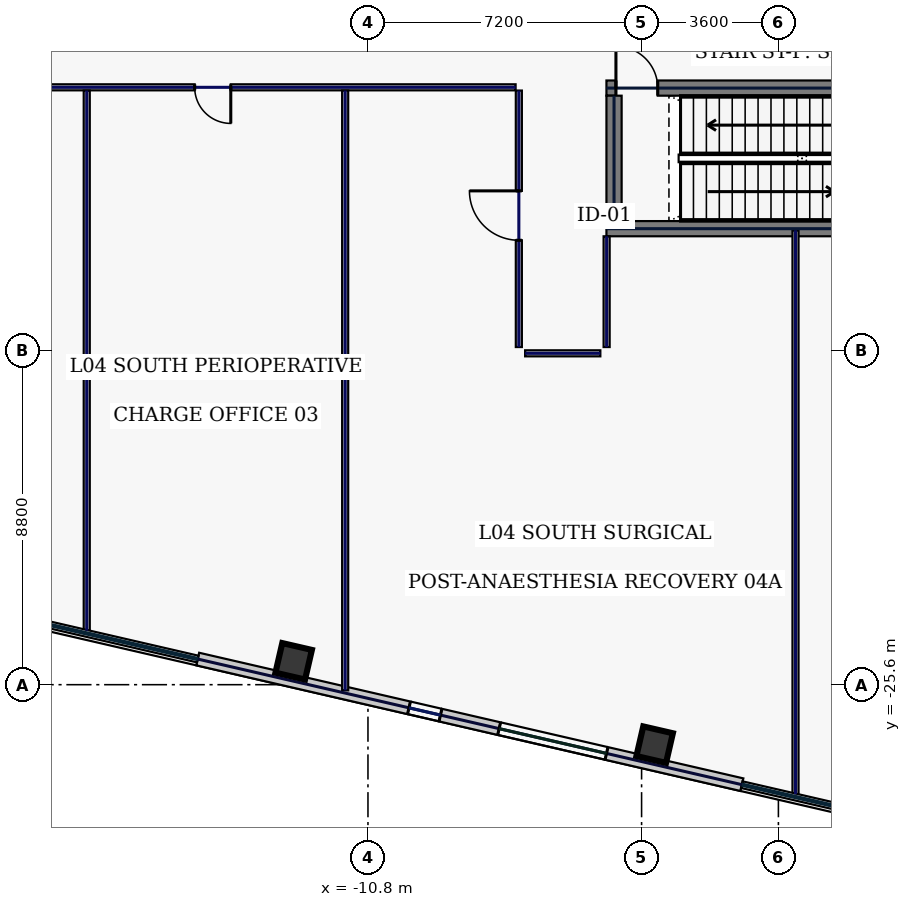
"""IFC4 building model, lengths in metres.
Left out: names, types, materials, properties, quantities, classifications, styles, units other than length and angle.
Written with IfcOpenShell. Run it as: python <this file> out.ifc"""

import sys

from ifc_helpers import new_model, si_unit, direction, frame, frame_2d, origin, origin_2d, place, context, subcontext, project, spatial, rectangle, hollow_rectangle, extrude, element, fill, save


model = new_model("IFC4")
c1 = context("Model", 3, precision=1e-05, world=origin(), true_north=direction((0.0, 1.0)))
c2 = subcontext(c1, "Body", "Model", "MODEL_VIEW")
j1 = project(units=[si_unit("LENGTHUNIT", "METRE"), si_unit("PLANEANGLEUNIT", "RADIAN")], contexts=[c1])
p1 = place(None, origin())
s1 = spatial("IfcSite", under=j1, at=p1, CompositionType="ELEMENT")
p2 = place(p1, origin())
s2 = spatial("IfcBuilding", under=s1, at=p2, CompositionType="ELEMENT")
p3 = place(p2, frame((0.0, 0.0, 23.4)))
s3 = spatial("IfcBuildingStorey", under=s2, at=p3, CompositionType="ELEMENT", Elevation=23.4)
p4 = place(p3, frame((-4.525, -13.6, 0.0), z_axis=(0.0, 0.0, 1.0), x_axis=(1.0, 0.0, 0.0)))
e1 = element("IfcWall", 1, at=p4, inside=s3, PredefinedType="SHEAR", context=c2, shape_type="SweptSolid", body=[
    extrude(rectangle(XDim=9.05, YDim=0.4, at=frame_2d((4.525, 0.0))), origin(), (0.0, 0.0, 1.0), 4.7),
])
p5 = place(p3, frame((-4.525, -9.9, 0.0), z_axis=(0.0, 0.0, 1.0), x_axis=(1.0, 0.0, 0.0)))
e2 = element("IfcWall", 2, at=p5, inside=s3, PredefinedType="SHEAR", context=c2, shape_type="SweptSolid", body=[
    extrude(rectangle(XDim=9.05, YDim=0.4, at=frame_2d((4.525, 0.0))), origin(), (0.0, 0.0, 1.0), 4.7),
])
p6 = place(p5, frame((0.25, 0.0, 0.0)))
e3 = element("IfcOpeningElement", 3, at=p6, cuts=e2, PredefinedType="OPENING", context=c2, shape_type="SweptSolid", body=[
    extrude(rectangle(XDim=1.1, YDim=2.2, at=frame_2d((0.55, 1.1))), frame((0.0, 0.21, 0.0), z_axis=(0.0, -1.0, 0.0), x_axis=(1.0, 0.0, 0.0)), (0.0, 0.0, 1.0), 0.42),
])
p7 = place(p3, frame((-4.325, -13.4, 0.0), z_axis=(0.0, 0.0, 1.0), x_axis=(0.0, 1.0, 0.0)))
e4 = element("IfcWall", 4, at=p7, inside=s3, PredefinedType="SHEAR", context=c2, shape_type="SweptSolid", body=[
    extrude(rectangle(XDim=3.3, YDim=0.4, at=frame_2d((1.65, 0.0))), origin(), (0.0, 0.0, 1.0), 4.7),
])
for number, where, z_axis, x_axis in (
    (5, (-12.755, -24.985, 0.0), (0.0, 0.0, 1.0), (0.974, -0.225, 0.0)),
    (6, (-3.256, -27.178, 0.0), (0.0, 0.0, 1.0), (0.974, -0.225, 0.0)),
):
    element("IfcColumn", number, at=place(p3, frame(where, z_axis=z_axis, x_axis=x_axis)), inside=s3, PredefinedType="COLUMN", context=c2, shape_type="SweptSolid", body=[
        extrude(hollow_rectangle(XDim=0.8, YDim=0.8, WallThickness=0.036, at=origin_2d()), origin(), (0.0, 0.0, 1.0), 4.7),
    ])
p8 = place(p3, frame((-15.281, -24.925, 0.0), z_axis=(0.0, 0.0, 1.0), x_axis=(0.974370193991, -0.22495049469, 0.0)))
e7 = element("IfcWall", 7, at=p8, inside=s3, PredefinedType="STANDARD", context=c2, shape_type="SweptSolid", body=[
    extrude(rectangle(XDim=14.697, YDim=0.34, at=frame_2d((7.349, 0.0))), origin(), (0.0, 0.0, 1.0), 4.7),
])
p9 = place(p8, frame((5.706, 0.0, 0.85)))
e8 = element("IfcOpeningElement", 8, at=p9, cuts=e7, PredefinedType="OPENING", context=c2, shape_type="SweptSolid", body=[
    extrude(rectangle(XDim=0.85, YDim=1.85, at=frame_2d((0.425, 0.925))), frame((0.0, 0.18, 0.0), z_axis=(0.0, -1.0, 0.0), x_axis=(1.0, 0.0, 0.0)), (0.0, 0.0, 1.0), 0.36),
])
p10 = place(p8, frame((8.141, 0.0, 0.85)))
e9 = element("IfcOpeningElement", 9, at=p10, cuts=e7, PredefinedType="OPENING", context=c2, shape_type="SweptSolid", body=[
    extrude(rectangle(XDim=2.9, YDim=2.3, at=frame_2d((1.45, 1.15))), frame((0.0, 0.18, 0.0), z_axis=(0.0, -1.0, 0.0), x_axis=(1.0, 0.0, 0.0)), (0.0, 0.0, 1.0), 0.36),
])
p11 = place(p3, frame((-4.52, -13.8, 0.0), z_axis=(0.0, 0.0, 1.0), x_axis=(0.0, -1.0, 0.0)))
e10 = element("IfcWall", 10, at=p11, inside=s3, PredefinedType="PARTITIONING", context=c2, shape_type="SweptSolid", body=[
    extrude(rectangle(XDim=2.915, YDim=0.16, at=frame_2d((1.458, 0.0))), origin(), (0.0, 0.0, 1.0), 4.7),
])
p12 = place(p3, frame((-4.685, -16.88, 0.0), z_axis=(0.0, 0.0, 1.0), x_axis=(-1.0, 0.0, 0.0)))
e11 = element("IfcWall", 11, at=p12, inside=s3, PredefinedType="PARTITIONING", context=c2, shape_type="SweptSolid", body=[
    extrude(rectangle(XDim=1.98, YDim=0.16, at=frame_2d((0.99, 0.0))), origin(), (0.0, 0.0, 1.0), 4.7),
])
p13 = place(p3, frame((-6.83, -16.715, 0.0), z_axis=(0.0, 0.0, 1.0), x_axis=(0.0, 1.0, 0.0)))
e12 = element("IfcWall", 12, at=p13, inside=s3, PredefinedType="PARTITIONING", context=c2, shape_type="SweptSolid", body=[
    extrude(rectangle(XDim=6.75, YDim=0.16, at=frame_2d((3.375, 0.0))), origin(), (0.0, 0.0, 1.0), 4.7),
])
p14 = place(p13, frame((2.81, 0.0, 0.0)))
e13 = element("IfcOpeningElement", 13, at=p14, cuts=e12, PredefinedType="OPENING", context=c2, shape_type="SweptSolid", body=[
    extrude(rectangle(XDim=1.3, YDim=2.2, at=frame_2d((0.65, 1.1))), frame((0.0, 0.09, 0.0), z_axis=(0.0, -1.0, 0.0), x_axis=(1.0, 0.0, 0.0)), (0.0, 0.0, 1.0), 0.18),
])
p15 = place(p3, frame((-6.915, -9.88, 0.0), z_axis=(0.0, 0.0, 1.0), x_axis=(-1.0, 0.0, 0.0)))
e14 = element("IfcWall", 14, at=p15, inside=s3, PredefinedType="PARTITIONING", context=c2, shape_type="SweptSolid", body=[
    extrude(rectangle(XDim=22.5, YDim=0.16, at=frame_2d((11.25, 0.0))), origin(), (0.0, 0.0, 1.0), 4.7),
])
p16 = place(p15, frame((19.501, 0.0, 0.0)))
e15 = element("IfcOpeningElement", 15, at=p16, cuts=e14, PredefinedType="OPENING", context=c2, shape_type="SweptSolid", body=[
    extrude(rectangle(XDim=1.3, YDim=2.2, at=frame_2d((0.65, 1.1))), frame((0.0, 0.09, 0.0), z_axis=(0.0, -1.0, 0.0), x_axis=(1.0, 0.0, 0.0)), (0.0, 0.0, 1.0), 0.18),
])
p17 = place(p15, frame((14.22, 0.0, 0.0)))
e16 = element("IfcOpeningElement", 16, at=p17, cuts=e14, PredefinedType="OPENING", context=c2, shape_type="SweptSolid", body=[
    extrude(rectangle(XDim=0.95, YDim=2.2, at=frame_2d((0.475, 1.1))), frame((0.0, 0.09, 0.0), z_axis=(0.0, -1.0, 0.0), x_axis=(1.0, 0.0, 0.0)), (0.0, 0.0, 1.0), 0.18),
])
p18 = place(p15, frame((7.495, 0.0, 0.0)))
e17 = element("IfcOpeningElement", 17, at=p18, cuts=e14, PredefinedType="OPENING", context=c2, shape_type="SweptSolid", body=[
    extrude(rectangle(XDim=0.95, YDim=2.2, at=frame_2d((0.475, 1.1))), frame((0.0, 0.09, 0.0), z_axis=(0.0, -1.0, 0.0), x_axis=(1.0, 0.0, 0.0)), (0.0, 0.0, 1.0), 0.18),
])
p19 = place(p3, frame((-18.2, -24.179, 0.0), z_axis=(0.0, 0.0, 1.0), x_axis=(0.0, 1.0, 0.0)))
e18 = element("IfcWall", 18, at=p19, inside=s3, PredefinedType="PARTITIONING", context=c2, shape_type="SweptSolid", body=[
    extrude(rectangle(XDim=14.214, YDim=0.16, at=frame_2d((7.107, 0.0))), origin(), (0.0, 0.0, 1.0), 4.7),
])
p20 = place(p3, frame((-11.4, -25.749, 0.0), z_axis=(0.0, 0.0, 1.0), x_axis=(0.0, 1.0, 0.0)))
e19 = element("IfcWall", 19, at=p20, inside=s3, PredefinedType="PARTITIONING", context=c2, shape_type="SweptSolid", body=[
    extrude(rectangle(XDim=15.784, YDim=0.16, at=frame_2d((7.892, 0.0))), origin(), (0.0, 0.0, 1.0), 4.7),
])
p21 = place(p3, frame((0.45, -28.485, 0.0), z_axis=(0.0, 0.0, 1.0), x_axis=(0.0, 1.0, 0.0)))
e20 = element("IfcWall", 20, at=p21, inside=s3, PredefinedType="PARTITIONING", context=c2, shape_type="SweptSolid", body=[
    extrude(rectangle(XDim=14.845, YDim=0.16, at=frame_2d((7.423, 0.0))), origin(), (0.0, 0.0, 1.0), 4.7),
])
p22 = place(p9, origin())
e21 = element("IfcWindow", 21, at=p22, inside=s3, PartitioningType="SINGLE_PANEL", PredefinedType="WINDOW", context=c2, shape_type="SweptSolid", body=[
    extrude(rectangle(XDim=0.85, YDim=1.85, at=frame_2d((0.425, 0.925))), frame((0.0, 0.03, 0.0), z_axis=(0.0, -1.0, 0.0), x_axis=(1.0, 0.0, 0.0)), (0.0, 0.0, 1.0), 0.06),
])
fill(e8, e21)
p23 = place(p10, origin())
e22 = element("IfcWindow", 22, at=p23, inside=s3, PartitioningType="SINGLE_PANEL", PredefinedType="WINDOW", context=c2, shape_type="SweptSolid", body=[
    extrude(rectangle(XDim=2.9, YDim=2.3, at=frame_2d((1.45, 1.15))), frame((0.0, 0.03, 0.0), z_axis=(0.0, -1.0, 0.0), x_axis=(1.0, 0.0, 0.0)), (0.0, 0.0, 1.0), 0.06),
])
fill(e9, e22)
p24 = place(p6, origin())
e23 = element("IfcDoor", 23, at=p24, inside=s3, OperationType="SINGLE_SWING_LEFT", PredefinedType="DOOR", context=c2, shape_type="SweptSolid", body=[
    extrude(rectangle(XDim=1.1, YDim=2.2, at=frame_2d((0.55, 1.1))), frame((0.0, 0.025, 0.0), z_axis=(0.0, -1.0, 0.0), x_axis=(1.0, 0.0, 0.0)), (0.0, 0.0, 1.0), 0.05),
])
fill(e3, e23)
p25 = place(p18, origin())
e24 = element("IfcDoor", 24, at=p25, inside=s3, OperationType="SINGLE_SWING_LEFT", PredefinedType="DOOR", context=c2, shape_type="SweptSolid", body=[
    extrude(rectangle(XDim=0.95, YDim=2.2, at=frame_2d((0.475, 1.1))), frame((0.0, 0.025, 0.0), z_axis=(0.0, -1.0, 0.0), x_axis=(1.0, 0.0, 0.0)), (0.0, 0.0, 1.0), 0.05),
])
fill(e17, e24)
p26 = place(p14, origin())
e25 = element("IfcDoor", 25, at=p26, inside=s3, OperationType="SINGLE_SWING_RIGHT", PredefinedType="DOOR", context=c2, shape_type="SweptSolid", body=[
    extrude(rectangle(XDim=1.3, YDim=2.2, at=frame_2d((0.65, 1.1))), frame((0.0, 0.025, 0.0), z_axis=(0.0, -1.0, 0.0), x_axis=(1.0, 0.0, 0.0)), (0.0, 0.0, 1.0), 0.05),
])
fill(e13, e25)
save(model, sys.argv[1])
